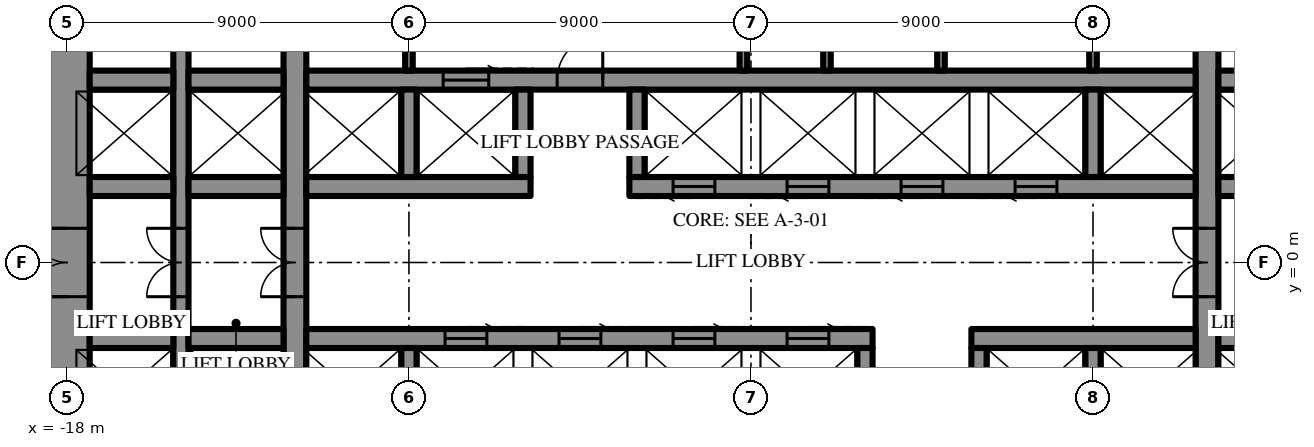
"""IFC4 building model, lengths in metres.
Left out: names, types, materials, properties, quantities, classifications, styles, units other than length and angle.
Written with IfcOpenShell. Run it as: python <this file> out.ifc"""

import sys

from ifc_helpers import new_model, si_unit, direction, frame, frame_2d, origin, place, context, subcontext, project, spatial, rectangle, extrude, element, fill, save


model = new_model("IFC4")
c1 = context("Model", 3, precision=1e-05, world=origin(), true_north=direction((0.0, 1.0)))
c2 = subcontext(c1, "Body", "Model", "MODEL_VIEW")
j1 = project(units=[si_unit("LENGTHUNIT", "METRE"), si_unit("PLANEANGLEUNIT", "RADIAN")], contexts=[c1])
p1 = place(None, origin())
s1 = spatial("IfcSite", under=j1, at=p1, CompositionType="ELEMENT")
p2 = place(p1, origin())
s2 = spatial("IfcBuilding", under=s1, at=p2, CompositionType="ELEMENT")
p3 = place(p2, frame((0.0, 0.0, 23.5)))
s3 = spatial("IfcBuildingStorey", under=s2, at=p3, CompositionType="ELEMENT", Elevation=23.5)
p4 = place(p3, frame((-18.0, 10.7, 0.0), z_axis=(0.0, 0.0, 1.0), x_axis=(0.0, -1.0, 0.0)))
e1 = element("IfcWall", 1, at=p4, inside=s3, PredefinedType="SHEAR", context=c2, shape_type="SweptSolid", body=[
    extrude(rectangle(XDim=21.4, YDim=1.2, at=frame_2d((10.7, 0.0))), origin(), (0.0, 0.0, 1.0), 4.2),
])
p5 = place(p4, frame((9.8, 0.0, 0.0)))
e2 = element("IfcOpeningElement", 2, at=p5, cuts=e1, PredefinedType="OPENING", context=c2, shape_type="SweptSolid", body=[
    extrude(rectangle(XDim=1.8, YDim=2.4, at=frame_2d((0.9, 1.2))), frame((0.0, 0.61, 0.0), z_axis=(0.0, -1.0, 0.0), x_axis=(1.0, 0.0, 0.0)), (0.0, 0.0, 1.0), 1.22),
])
p6 = place(p3, frame((12.0, -10.7, 0.0), z_axis=(0.0, 0.0, 1.0), x_axis=(0.0, 1.0, 0.0)))
e3 = element("IfcWall", 3, at=p6, inside=s3, PredefinedType="SHEAR", context=c2, shape_type="SweptSolid", body=[
    extrude(rectangle(XDim=21.4, YDim=0.6, at=frame_2d((10.7, 0.0))), origin(), (0.0, 0.0, 1.0), 4.2),
])
p7 = place(p6, frame((9.8, 0.0, 0.0)))
e4 = element("IfcOpeningElement", 4, at=p7, cuts=e3, PredefinedType="OPENING", context=c2, shape_type="SweptSolid", body=[
    extrude(rectangle(XDim=1.8, YDim=2.4, at=frame_2d((0.9, 1.2))), frame((0.0, 0.31, 0.0), z_axis=(0.0, -1.0, 0.0), x_axis=(1.0, 0.0, 0.0)), (0.0, 0.0, 1.0), 0.62),
])
p8 = place(p3, frame((-12.0, -10.7, 0.0), z_axis=(0.0, 0.0, 1.0), x_axis=(0.0, 1.0, 0.0)))
e5 = element("IfcWall", 5, at=p8, inside=s3, PredefinedType="SHEAR", context=c2, shape_type="SweptSolid", body=[
    extrude(rectangle(XDim=21.4, YDim=0.6, at=frame_2d((10.7, 0.0))), origin(), (0.0, 0.0, 1.0), 4.2),
])
p9 = place(p8, frame((9.8, 0.0, 0.0)))
e6 = element("IfcOpeningElement", 6, at=p9, cuts=e5, PredefinedType="OPENING", context=c2, shape_type="SweptSolid", body=[
    extrude(rectangle(XDim=1.8, YDim=2.4, at=frame_2d((0.9, 1.2))), frame((0.0, 0.31, 0.0), z_axis=(0.0, -1.0, 0.0), x_axis=(1.0, 0.0, 0.0)), (0.0, 0.0, 1.0), 0.62),
])
p10 = place(p3, frame((-15.0, -10.7, 0.0), z_axis=(0.0, 0.0, 1.0), x_axis=(0.0, 1.0, 0.0)))
e7 = element("IfcWall", 7, at=p10, inside=s3, PredefinedType="SHEAR", context=c2, shape_type="SweptSolid", body=[
    extrude(rectangle(XDim=21.4, YDim=0.4, at=frame_2d((10.7, 0.0))), origin(), (0.0, 0.0, 1.0), 4.2),
])
p11 = place(p10, frame((9.8, 0.0, 0.0)))
e8 = element("IfcOpeningElement", 8, at=p11, cuts=e7, PredefinedType="OPENING", context=c2, shape_type="SweptSolid", body=[
    extrude(rectangle(XDim=1.8, YDim=2.4, at=frame_2d((0.9, 1.2))), frame((0.0, 0.21, 0.0), z_axis=(0.0, -1.0, 0.0), x_axis=(1.0, 0.0, 0.0)), (0.0, 0.0, 1.0), 0.42),
])
p12 = place(p3, frame((-17.4, 2.0, 0.0), z_axis=(0.0, 0.0, 1.0), x_axis=(1.0, 0.0, 0.0)))
e9 = element("IfcWall", 9, at=p12, inside=s3, PredefinedType="SHEAR", context=c2, shape_type="SweptSolid", body=[
    extrude(rectangle(XDim=2.2, YDim=0.5, at=frame_2d((1.1, 0.0))), origin(), (0.0, 0.0, 1.0), 4.2),
])
p13 = place(p3, frame((-14.8, 2.0, 0.0), z_axis=(0.0, 0.0, 1.0), x_axis=(1.0, 0.0, 0.0)))
e10 = element("IfcWall", 10, at=p13, inside=s3, PredefinedType="SHEAR", context=c2, shape_type="SweptSolid", body=[
    extrude(rectangle(XDim=2.5, YDim=0.5, at=frame_2d((1.25, 0.0))), origin(), (0.0, 0.0, 1.0), 4.2),
])
p14 = place(p3, frame((-11.7, 2.0, 0.0), z_axis=(0.0, 0.0, 1.0), x_axis=(1.0, 0.0, 0.0)))
e11 = element("IfcWall", 11, at=p14, inside=s3, PredefinedType="SHEAR", context=c2, shape_type="SweptSolid", body=[
    extrude(rectangle(XDim=5.9, YDim=0.5, at=frame_2d((2.95, 0.0))), origin(), (0.0, 0.0, 1.0), 4.2),
])
p15 = place(p3, frame((-3.2, 2.0, 0.0), z_axis=(0.0, 0.0, 1.0), x_axis=(1.0, 0.0, 0.0)))
e12 = element("IfcWall", 12, at=p15, inside=s3, PredefinedType="SHEAR", context=c2, shape_type="SweptSolid", body=[
    extrude(rectangle(XDim=14.9, YDim=0.5, at=frame_2d((7.45, 0.0))), origin(), (0.0, 0.0, 1.0), 4.2),
])
p16 = place(p15, frame((1.15, 0.0, 0.0)))
e13 = element("IfcOpeningElement", 13, at=p16, cuts=e12, PredefinedType="OPENING", context=c2, shape_type="SweptSolid", body=[
    extrude(rectangle(XDim=1.1, YDim=2.2, at=frame_2d((0.55, 1.1))), frame((0.0, 0.26, 0.0), z_axis=(0.0, -1.0, 0.0), x_axis=(1.0, 0.0, 0.0)), (0.0, 0.0, 1.0), 0.52),
])
p17 = place(p15, frame((4.15, 0.0, 0.0)))
e14 = element("IfcOpeningElement", 14, at=p17, cuts=e12, PredefinedType="OPENING", context=c2, shape_type="SweptSolid", body=[
    extrude(rectangle(XDim=1.1, YDim=2.2, at=frame_2d((0.55, 1.1))), frame((0.0, 0.26, 0.0), z_axis=(0.0, -1.0, 0.0), x_axis=(1.0, 0.0, 0.0)), (0.0, 0.0, 1.0), 0.52),
])
p18 = place(p15, frame((7.15, 0.0, 0.0)))
e15 = element("IfcOpeningElement", 15, at=p18, cuts=e12, PredefinedType="OPENING", context=c2, shape_type="SweptSolid", body=[
    extrude(rectangle(XDim=1.1, YDim=2.2, at=frame_2d((0.55, 1.1))), frame((0.0, 0.26, 0.0), z_axis=(0.0, -1.0, 0.0), x_axis=(1.0, 0.0, 0.0)), (0.0, 0.0, 1.0), 0.52),
])
p19 = place(p15, frame((10.15, 0.0, 0.0)))
e16 = element("IfcOpeningElement", 16, at=p19, cuts=e12, PredefinedType="OPENING", context=c2, shape_type="SweptSolid", body=[
    extrude(rectangle(XDim=1.1, YDim=2.2, at=frame_2d((0.55, 1.1))), frame((0.0, 0.26, 0.0), z_axis=(0.0, -1.0, 0.0), x_axis=(1.0, 0.0, 0.0)), (0.0, 0.0, 1.0), 0.52),
])
p20 = place(p3, frame((12.3, 2.0, 0.0), z_axis=(0.0, 0.0, 1.0), x_axis=(1.0, 0.0, 0.0)))
e17 = element("IfcWall", 17, at=p20, inside=s3, PredefinedType="SHEAR", context=c2, shape_type="SweptSolid", body=[
    extrude(rectangle(XDim=2.5, YDim=0.5, at=frame_2d((1.25, 0.0))), origin(), (0.0, 0.0, 1.0), 4.2),
])
p21 = place(p3, frame((-17.4, 4.8, 0.0), z_axis=(0.0, 0.0, 1.0), x_axis=(1.0, 0.0, 0.0)))
e18 = element("IfcWall", 18, at=p21, inside=s3, PredefinedType="SHEAR", context=c2, shape_type="SweptSolid", body=[
    extrude(rectangle(XDim=2.2, YDim=0.5, at=frame_2d((1.1, 0.0))), origin(), (0.0, 0.0, 1.0), 4.2),
])
p22 = place(p3, frame((-14.8, 4.8, 0.0), z_axis=(0.0, 0.0, 1.0), x_axis=(1.0, 0.0, 0.0)))
e19 = element("IfcWall", 19, at=p22, inside=s3, PredefinedType="SHEAR", context=c2, shape_type="SweptSolid", body=[
    extrude(rectangle(XDim=2.5, YDim=0.5, at=frame_2d((1.25, 0.0))), origin(), (0.0, 0.0, 1.0), 4.2),
])
p23 = place(p3, frame((-11.7, 4.8, 0.0), z_axis=(0.0, 0.0, 1.0), x_axis=(1.0, 0.0, 0.0)))
e20 = element("IfcWall", 20, at=p23, inside=s3, PredefinedType="SHEAR", context=c2, shape_type="SweptSolid", body=[
    extrude(rectangle(XDim=23.4, YDim=0.5, at=frame_2d((11.7, 0.0))), origin(), (0.0, 0.0, 1.0), 4.2),
])
p24 = place(p23, frame((6.6, 0.0, 0.0)))
e21 = element("IfcOpeningElement", 21, at=p24, cuts=e20, PredefinedType="OPENING", context=c2, shape_type="SweptSolid", body=[
    extrude(rectangle(XDim=1.2, YDim=2.2, at=frame_2d((0.6, 1.1))), frame((0.0, 0.26, 0.0), z_axis=(0.0, -1.0, 0.0), x_axis=(1.0, 0.0, 0.0)), (0.0, 0.0, 1.0), 0.52),
])
p25 = place(p23, frame((3.6, 0.0, 0.0)))
e22 = element("IfcOpeningElement", 22, at=p25, cuts=e20, PredefinedType="OPENING", context=c2, shape_type="SweptSolid", body=[
    extrude(rectangle(XDim=1.2, YDim=2.2, at=frame_2d((0.6, 1.1))), frame((0.0, 0.26, 0.0), z_axis=(0.0, -1.0, 0.0), x_axis=(1.0, 0.0, 0.0)), (0.0, 0.0, 1.0), 0.52),
])
p26 = place(p3, frame((12.3, 4.8, 0.0), z_axis=(0.0, 0.0, 1.0), x_axis=(1.0, 0.0, 0.0)))
e23 = element("IfcWall", 23, at=p26, inside=s3, PredefinedType="SHEAR", context=c2, shape_type="SweptSolid", body=[
    extrude(rectangle(XDim=2.5, YDim=0.5, at=frame_2d((1.25, 0.0))), origin(), (0.0, 0.0, 1.0), 4.2),
])
for number, where, z_axis, x_axis in (
    (24, (-9.0, 2.25, 0.0), (0.0, 0.0, 1.0), (0.0, 1.0, 0.0)),
    (25, (-6.0, 2.25, 0.0), (0.0, 0.0, 1.0), (0.0, 1.0, 0.0)),
    (26, (-3.0, 2.25, 0.0), (0.0, 0.0, 1.0), (0.0, 1.0, 0.0)),
    (27, (9.0, 2.25, 0.0), (0.0, 0.0, 1.0), (0.0, 1.0, 0.0)),
):
    element("IfcWall", number, at=place(p3, frame(where, z_axis=z_axis, x_axis=x_axis)), inside=s3, PredefinedType="SHEAR", context=c2, shape_type="SweptSolid", body=[
        extrude(rectangle(XDim=2.3, YDim=0.4, at=frame_2d((1.15, 0.0))), origin(), (0.0, 0.0, 1.0), 4.2),
    ])
p27 = place(p3, frame((-0.2, 5.05, 0.0), z_axis=(0.0, 0.0, 1.0), x_axis=(0.0, 1.0, 0.0)))
e28 = element("IfcWall", 28, at=p27, inside=s3, PredefinedType="SHEAR", context=c2, shape_type="SweptSolid", body=[
    extrude(rectangle(XDim=5.65, YDim=0.2, at=frame_2d((2.825, 0.0))), origin(), (0.0, 0.0, 1.0), 4.2),
])
p28 = place(p3, frame((14.8, -2.0, 0.0), z_axis=(0.0, 0.0, 1.0), x_axis=(-1.0, 0.0, 0.0)))
e29 = element("IfcWall", 29, at=p28, inside=s3, PredefinedType="SHEAR", context=c2, shape_type="SweptSolid", body=[
    extrude(rectangle(XDim=2.5, YDim=0.5, at=frame_2d((1.25, 0.0))), origin(), (0.0, 0.0, 1.0), 4.2),
])
p29 = place(p3, frame((11.7, -2.0, 0.0), z_axis=(0.0, 0.0, 1.0), x_axis=(-1.0, 0.0, 0.0)))
e30 = element("IfcWall", 30, at=p29, inside=s3, PredefinedType="SHEAR", context=c2, shape_type="SweptSolid", body=[
    extrude(rectangle(XDim=5.9, YDim=0.5, at=frame_2d((2.95, 0.0))), origin(), (0.0, 0.0, 1.0), 4.2),
])
p30 = place(p3, frame((3.2, -2.0, 0.0), z_axis=(0.0, 0.0, 1.0), x_axis=(-1.0, 0.0, 0.0)))
e31 = element("IfcWall", 31, at=p30, inside=s3, PredefinedType="SHEAR", context=c2, shape_type="SweptSolid", body=[
    extrude(rectangle(XDim=14.9, YDim=0.5, at=frame_2d((7.45, 0.0))), origin(), (0.0, 0.0, 1.0), 4.2),
])
p31 = place(p30, frame((1.15, 0.0, 0.0)))
e32 = element("IfcOpeningElement", 32, at=p31, cuts=e31, PredefinedType="OPENING", context=c2, shape_type="SweptSolid", body=[
    extrude(rectangle(XDim=1.1, YDim=2.2, at=frame_2d((0.55, 1.1))), frame((0.0, 0.26, 0.0), z_axis=(0.0, -1.0, 0.0), x_axis=(1.0, 0.0, 0.0)), (0.0, 0.0, 1.0), 0.52),
])
p32 = place(p30, frame((4.15, 0.0, 0.0)))
e33 = element("IfcOpeningElement", 33, at=p32, cuts=e31, PredefinedType="OPENING", context=c2, shape_type="SweptSolid", body=[
    extrude(rectangle(XDim=1.1, YDim=2.2, at=frame_2d((0.55, 1.1))), frame((0.0, 0.26, 0.0), z_axis=(0.0, -1.0, 0.0), x_axis=(1.0, 0.0, 0.0)), (0.0, 0.0, 1.0), 0.52),
])
p33 = place(p30, frame((7.15, 0.0, 0.0)))
e34 = element("IfcOpeningElement", 34, at=p33, cuts=e31, PredefinedType="OPENING", context=c2, shape_type="SweptSolid", body=[
    extrude(rectangle(XDim=1.1, YDim=2.2, at=frame_2d((0.55, 1.1))), frame((0.0, 0.26, 0.0), z_axis=(0.0, -1.0, 0.0), x_axis=(1.0, 0.0, 0.0)), (0.0, 0.0, 1.0), 0.52),
])
p34 = place(p30, frame((10.15, 0.0, 0.0)))
e35 = element("IfcOpeningElement", 35, at=p34, cuts=e31, PredefinedType="OPENING", context=c2, shape_type="SweptSolid", body=[
    extrude(rectangle(XDim=1.1, YDim=2.2, at=frame_2d((0.55, 1.1))), frame((0.0, 0.26, 0.0), z_axis=(0.0, -1.0, 0.0), x_axis=(1.0, 0.0, 0.0)), (0.0, 0.0, 1.0), 0.52),
])
p35 = place(p3, frame((-12.3, -2.0, 0.0), z_axis=(0.0, 0.0, 1.0), x_axis=(-1.0, 0.0, 0.0)))
e36 = element("IfcWall", 36, at=p35, inside=s3, PredefinedType="SHEAR", context=c2, shape_type="SweptSolid", body=[
    extrude(rectangle(XDim=2.5, YDim=0.5, at=frame_2d((1.25, 0.0))), origin(), (0.0, 0.0, 1.0), 4.2),
])
p36 = place(p3, frame((-15.2, -2.0, 0.0), z_axis=(0.0, 0.0, 1.0), x_axis=(-1.0, 0.0, 0.0)))
e37 = element("IfcWall", 37, at=p36, inside=s3, PredefinedType="SHEAR", context=c2, shape_type="SweptSolid", body=[
    extrude(rectangle(XDim=2.2, YDim=0.5, at=frame_2d((1.1, 0.0))), origin(), (0.0, 0.0, 1.0), 4.2),
])
for number, where, z_axis, x_axis in (
    (38, (9.0, -2.25, 0.0), (0.0, 0.0, 1.0), (0.0, -1.0, 0.0)),
    (39, (6.0, -2.25, 0.0), (0.0, 0.0, 1.0), (0.0, -1.0, 0.0)),
    (40, (3.0, -2.25, 0.0), (0.0, 0.0, 1.0), (0.0, -1.0, 0.0)),
    (41, (-9.0, -2.25, 0.0), (0.0, 0.0, 1.0), (0.0, -1.0, 0.0)),
):
    element("IfcWall", number, at=place(p3, frame(where, z_axis=z_axis, x_axis=x_axis)), inside=s3, PredefinedType="SHEAR", context=c2, shape_type="SweptSolid", body=[
        extrude(rectangle(XDim=2.3, YDim=0.4, at=frame_2d((1.15, 0.0))), origin(), (0.0, 0.0, 1.0), 4.2),
    ])
for number, where, z_axis, x_axis in (
    (42, (-9.0, 5.05, 0.0), (0.0, 0.0, 1.0), (0.0, 1.0, 0.0)),
    (43, (9.0, 5.05, 0.0), (0.0, 0.0, 1.0), (0.0, 1.0, 0.0)),
    (44, (2.0, 5.05, 0.0), (0.0, 0.0, 1.0), (0.0, 1.0, 0.0)),
    (45, (5.0, 5.05, 0.0), (0.0, 0.0, 1.0), (0.0, 1.0, 0.0)),
):
    element("IfcWall", number, at=place(p3, frame(where, z_axis=z_axis, x_axis=x_axis)), inside=s3, PredefinedType="PARTITIONING", context=c2, shape_type="SweptSolid", body=[
        extrude(rectangle(XDim=5.65, YDim=0.2, at=frame_2d((2.825, 0.0))), origin(), (0.0, 0.0, 1.0), 4.0),
    ])
p37 = place(p5, frame((1.8, 0.0, 0.0), z_axis=(0.0, 0.0, 1.0), x_axis=(-1.0, 0.0, 0.0)))
e46 = element("IfcDoor", 46, at=p37, inside=s3, OperationType="DOUBLE_DOOR_SINGLE_SWING", PredefinedType="DOOR", context=c2, shape_type="SweptSolid", body=[
    extrude(rectangle(XDim=1.8, YDim=2.4, at=frame_2d((0.9, 1.2))), frame((0.0, 0.025, 0.0), z_axis=(0.0, -1.0, 0.0), x_axis=(1.0, 0.0, 0.0)), (0.0, 0.0, 1.0), 0.05),
])
fill(e2, e46)
p38 = place(p24, origin())
e47 = element("IfcDoor", 47, at=p38, inside=s3, OperationType="SINGLE_SWING_LEFT", PredefinedType="DOOR", context=c2, shape_type="SweptSolid", body=[
    extrude(rectangle(XDim=1.2, YDim=2.2, at=frame_2d((0.6, 1.1))), frame((0.0, 0.025, 0.0), z_axis=(0.0, -1.0, 0.0), x_axis=(1.0, 0.0, 0.0)), (0.0, 0.0, 1.0), 0.05),
])
fill(e21, e47)
p39 = place(p7, origin())
e48 = element("IfcDoor", 48, at=p39, inside=s3, OperationType="DOUBLE_DOOR_SINGLE_SWING", PredefinedType="DOOR", context=c2, shape_type="SweptSolid", body=[
    extrude(rectangle(XDim=1.8, YDim=2.4, at=frame_2d((0.9, 1.2))), frame((0.0, 0.025, 0.0), z_axis=(0.0, -1.0, 0.0), x_axis=(1.0, 0.0, 0.0)), (0.0, 0.0, 1.0), 0.05),
])
fill(e4, e48)
p40 = place(p9, origin())
e49 = element("IfcDoor", 49, at=p40, inside=s3, OperationType="DOUBLE_DOOR_SINGLE_SWING", PredefinedType="DOOR", context=c2, shape_type="SweptSolid", body=[
    extrude(rectangle(XDim=1.8, YDim=2.4, at=frame_2d((0.9, 1.2))), frame((0.0, 0.025, 0.0), z_axis=(0.0, -1.0, 0.0), x_axis=(1.0, 0.0, 0.0)), (0.0, 0.0, 1.0), 0.05),
])
fill(e6, e49)
p41 = place(p11, origin())
e50 = element("IfcDoor", 50, at=p41, inside=s3, OperationType="DOUBLE_DOOR_SINGLE_SWING", PredefinedType="DOOR", context=c2, shape_type="SweptSolid", body=[
    extrude(rectangle(XDim=1.8, YDim=2.4, at=frame_2d((0.9, 1.2))), frame((0.0, 0.025, 0.0), z_axis=(0.0, -1.0, 0.0), x_axis=(1.0, 0.0, 0.0)), (0.0, 0.0, 1.0), 0.05),
])
fill(e8, e50)
p42 = place(p25, origin())
e51 = element("IfcDoor", 51, at=p42, inside=s3, OperationType="SLIDING_TO_LEFT", PredefinedType="DOOR", context=c2, shape_type="SweptSolid", body=[
    extrude(rectangle(XDim=1.2, YDim=2.2, at=frame_2d((0.6, 1.1))), frame((0.0, 0.025, 0.0), z_axis=(0.0, -1.0, 0.0), x_axis=(1.0, 0.0, 0.0)), (0.0, 0.0, 1.0), 0.05),
])
fill(e22, e51)
p43 = place(p16, frame((1.1, 0.0, 0.0), z_axis=(0.0, 0.0, 1.0), x_axis=(-1.0, 0.0, 0.0)))
e52 = element("IfcDoor", 52, at=p43, inside=s3, OperationType="SLIDING_TO_LEFT", PredefinedType="DOOR", context=c2, shape_type="SweptSolid", body=[
    extrude(rectangle(XDim=1.1, YDim=2.2, at=frame_2d((0.55, 1.1))), frame((0.0, 0.025, 0.0), z_axis=(0.0, -1.0, 0.0), x_axis=(1.0, 0.0, 0.0)), (0.0, 0.0, 1.0), 0.05),
])
fill(e13, e52)
p44 = place(p17, frame((1.1, 0.0, 0.0), z_axis=(0.0, 0.0, 1.0), x_axis=(-1.0, 0.0, 0.0)))
e53 = element("IfcDoor", 53, at=p44, inside=s3, OperationType="SLIDING_TO_LEFT", PredefinedType="DOOR", context=c2, shape_type="SweptSolid", body=[
    extrude(rectangle(XDim=1.1, YDim=2.2, at=frame_2d((0.55, 1.1))), frame((0.0, 0.025, 0.0), z_axis=(0.0, -1.0, 0.0), x_axis=(1.0, 0.0, 0.0)), (0.0, 0.0, 1.0), 0.05),
])
fill(e14, e53)
p45 = place(p18, frame((1.1, 0.0, 0.0), z_axis=(0.0, 0.0, 1.0), x_axis=(-1.0, 0.0, 0.0)))
e54 = element("IfcDoor", 54, at=p45, inside=s3, OperationType="SLIDING_TO_LEFT", PredefinedType="DOOR", context=c2, shape_type="SweptSolid", body=[
    extrude(rectangle(XDim=1.1, YDim=2.2, at=frame_2d((0.55, 1.1))), frame((0.0, 0.025, 0.0), z_axis=(0.0, -1.0, 0.0), x_axis=(1.0, 0.0, 0.0)), (0.0, 0.0, 1.0), 0.05),
])
fill(e15, e54)
p46 = place(p19, frame((1.1, 0.0, 0.0), z_axis=(0.0, 0.0, 1.0), x_axis=(-1.0, 0.0, 0.0)))
e55 = element("IfcDoor", 55, at=p46, inside=s3, OperationType="SLIDING_TO_LEFT", PredefinedType="DOOR", context=c2, shape_type="SweptSolid", body=[
    extrude(rectangle(XDim=1.1, YDim=2.2, at=frame_2d((0.55, 1.1))), frame((0.0, 0.025, 0.0), z_axis=(0.0, -1.0, 0.0), x_axis=(1.0, 0.0, 0.0)), (0.0, 0.0, 1.0), 0.05),
])
fill(e16, e55)
p47 = place(p31, frame((1.1, 0.0, 0.0), z_axis=(0.0, 0.0, 1.0), x_axis=(-1.0, 0.0, 0.0)))
e56 = element("IfcDoor", 56, at=p47, inside=s3, OperationType="SLIDING_TO_LEFT", PredefinedType="DOOR", context=c2, shape_type="SweptSolid", body=[
    extrude(rectangle(XDim=1.1, YDim=2.2, at=frame_2d((0.55, 1.1))), frame((0.0, 0.025, 0.0), z_axis=(0.0, -1.0, 0.0), x_axis=(1.0, 0.0, 0.0)), (0.0, 0.0, 1.0), 0.05),
])
fill(e32, e56)
p48 = place(p32, frame((1.1, 0.0, 0.0), z_axis=(0.0, 0.0, 1.0), x_axis=(-1.0, 0.0, 0.0)))
e57 = element("IfcDoor", 57, at=p48, inside=s3, OperationType="SLIDING_TO_LEFT", PredefinedType="DOOR", context=c2, shape_type="SweptSolid", body=[
    extrude(rectangle(XDim=1.1, YDim=2.2, at=frame_2d((0.55, 1.1))), frame((0.0, 0.025, 0.0), z_axis=(0.0, -1.0, 0.0), x_axis=(1.0, 0.0, 0.0)), (0.0, 0.0, 1.0), 0.05),
])
fill(e33, e57)
p49 = place(p33, frame((1.1, 0.0, 0.0), z_axis=(0.0, 0.0, 1.0), x_axis=(-1.0, 0.0, 0.0)))
e58 = element("IfcDoor", 58, at=p49, inside=s3, OperationType="SLIDING_TO_LEFT", PredefinedType="DOOR", context=c2, shape_type="SweptSolid", body=[
    extrude(rectangle(XDim=1.1, YDim=2.2, at=frame_2d((0.55, 1.1))), frame((0.0, 0.025, 0.0), z_axis=(0.0, -1.0, 0.0), x_axis=(1.0, 0.0, 0.0)), (0.0, 0.0, 1.0), 0.05),
])
fill(e34, e58)
p50 = place(p34, frame((1.1, 0.0, 0.0), z_axis=(0.0, 0.0, 1.0), x_axis=(-1.0, 0.0, 0.0)))
e59 = element("IfcDoor", 59, at=p50, inside=s3, OperationType="SLIDING_TO_LEFT", PredefinedType="DOOR", context=c2, shape_type="SweptSolid", body=[
    extrude(rectangle(XDim=1.1, YDim=2.2, at=frame_2d((0.55, 1.1))), frame((0.0, 0.025, 0.0), z_axis=(0.0, -1.0, 0.0), x_axis=(1.0, 0.0, 0.0)), (0.0, 0.0, 1.0), 0.05),
])
fill(e35, e59)
save(model, sys.argv[1])
